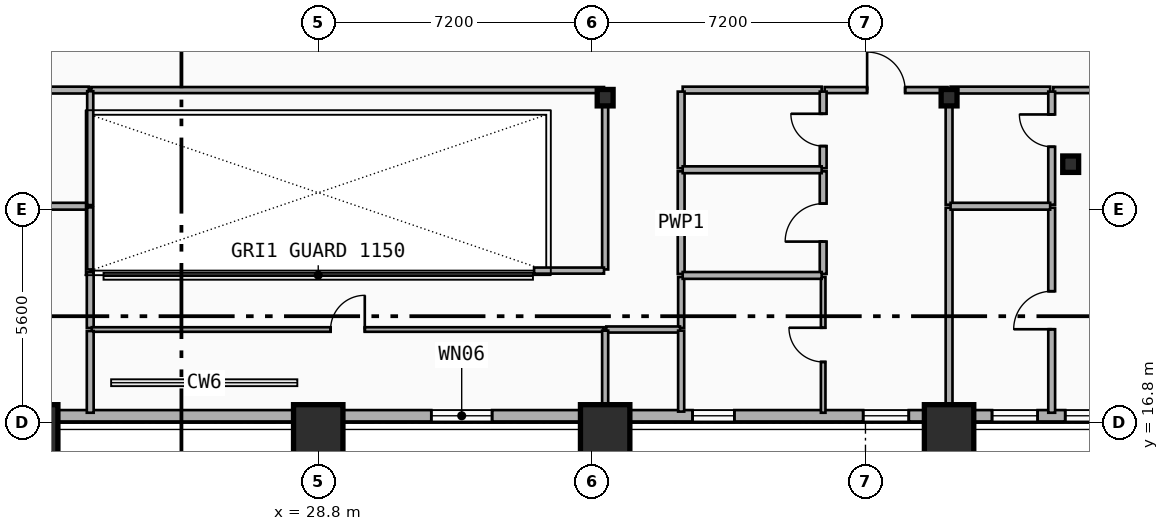
"""IFC4 building model, lengths in metres.
Left out: names, types, materials, properties, quantities, classifications, styles, units other than length and angle.
Written with IfcOpenShell. Run it as: python <this file> out.ifc"""

import sys

from ifc_helpers import new_model, si_unit, direction, frame, frame_2d, origin, origin_2d, place, context, subcontext, project, spatial, rectangle, i_section, extrude, element, fill, save


model = new_model("IFC4")
c1 = context("Model", 3, precision=1e-05, world=origin(), true_north=direction((0.0, 1.0)))
c2 = subcontext(c1, "Body", "Model", "MODEL_VIEW")
j1 = project(units=[si_unit("LENGTHUNIT", "METRE"), si_unit("PLANEANGLEUNIT", "RADIAN")], contexts=[c1])
p1 = place(None, origin())
s1 = spatial("IfcSite", under=j1, at=p1, CompositionType="ELEMENT")
p2 = place(p1, origin())
s2 = spatial("IfcBuilding", under=s1, at=p2, CompositionType="ELEMENT")
p3 = place(p2, frame((0.0, 0.0, 104.8)))
s3 = spatial("IfcBuildingStorey", under=s2, at=p3, CompositionType="ELEMENT", Elevation=104.8)
for number, where, z_axis, x_axis in (
    (1, (36.35, 25.35, 0.0), (0.0, 0.0, 1.0), (1.0, 0.0, 0.0)),
    (2, (45.4, 25.35, 0.0), (0.0, 0.0, 1.0), (1.0, 0.0, 0.0)),
):
    element("IfcColumn", number, at=place(p3, frame(where, z_axis=z_axis, x_axis=x_axis)), inside=s3, PredefinedType="COLUMN", context=c2, shape_type="SweptSolid", body=[
        extrude(i_section(OverallWidth=0.418, OverallDepth=0.432, WebThickness=0.035, FlangeThickness=0.056, FilletRadius=0.015, at=origin_2d()), origin(), (0.0, 0.0, 1.0), 3.5),
    ])
for number, where, z_axis, x_axis in (
    (3, (21.3, 16.731, 0.0), (0.0, -0.09, 0.996), (1.0, 0.0, 0.0)),
    (4, (28.8, 16.731, 0.0), (0.0, -0.09, 0.996), (1.0, 0.0, 0.0)),
    (5, (36.35, 16.731, 0.0), (0.0, -0.09, 0.996), (1.0, 0.0, 0.0)),
    (6, (45.4, 16.731, 0.0), (0.0, -0.09, 0.996), (1.0, 0.0, 0.0)),
):
    element("IfcColumn", number, at=place(p3, frame(where, z_axis=z_axis, x_axis=x_axis)), inside=s3, PredefinedType="COLUMN", context=c2, shape_type="SweptSolid", body=[
        extrude(rectangle(XDim=1.3, YDim=1.3, at=origin_2d()), origin(), (0.0, 0.0, 1.0), 3.514),
    ])
p4 = place(p3, frame((48.6, 23.6, 0.0), z_axis=(0.0, 0.0, 1.0), x_axis=(1.0, 0.0, 0.0)))
e7 = element("IfcColumn", 7, at=p4, inside=s3, PredefinedType="COLUMN", context=c2, shape_type="SweptSolid", body=[
    extrude(i_section(OverallWidth=0.418, OverallDepth=0.432, WebThickness=0.035, FlangeThickness=0.056, FilletRadius=0.015, at=origin_2d()), origin(), (0.0, 0.0, 1.0), 3.5),
])
p5 = place(p3, frame((53.4, 16.98, 0.0), z_axis=(0.0, 0.0, 1.0), x_axis=(-1.0, 0.0, 0.0)))
e8 = element("IfcWall", 8, at=p5, inside=s3, PredefinedType="SOLIDWALL", context=c2, shape_type="SweptSolid", body=[
    extrude(rectangle(XDim=49.2, YDim=0.3, at=frame_2d((24.6, 0.0))), origin(), (0.0, 0.0, 1.0), 3.24),
])
p6 = place(p5, frame((44.256, 0.0, 0.75)))
e9 = element("IfcOpeningElement", 9, at=p6, cuts=e8, PredefinedType="OPENING", context=c2, shape_type="SweptSolid", body=[
    extrude(rectangle(XDim=1.4, YDim=1.8, at=frame_2d((0.7, 0.9))), frame((0.0, 0.16, 0.0), z_axis=(0.0, -1.0, 0.0), x_axis=(1.0, 0.0, 0.0)), (0.0, 0.0, 1.0), 0.32),
])
p7 = place(p5, frame((42.33, 0.0, 0.68)))
e10 = element("IfcOpeningElement", 10, at=p7, cuts=e8, PredefinedType="OPENING", context=c2, shape_type="SweptSolid", body=[
    extrude(rectangle(XDim=1.2, YDim=1.5, at=frame_2d((0.6, 0.75))), frame((0.0, 0.16, 0.0), z_axis=(0.0, -1.0, 0.0), x_axis=(1.0, 0.0, 0.0)), (0.0, 0.0, 1.0), 0.32),
])
p8 = place(p5, frame((33.338, 0.0, 0.34)))
e11 = element("IfcOpeningElement", 11, at=p8, cuts=e8, PredefinedType="OPENING", context=c2, shape_type="SweptSolid", body=[
    extrude(rectangle(XDim=1.2, YDim=1.5, at=frame_2d((0.6, 0.75))), frame((0.0, 0.16, 0.0), z_axis=(0.0, -1.0, 0.0), x_axis=(1.0, 0.0, 0.0)), (0.0, 0.0, 1.0), 0.32),
])
p9 = place(p5, frame((39.04, 0.0, 1.22)))
e12 = element("IfcOpeningElement", 12, at=p9, cuts=e8, PredefinedType="OPENING", context=c2, shape_type="SweptSolid", body=[
    extrude(rectangle(XDim=1.1, YDim=1.05, at=frame_2d((0.55, 0.525))), frame((0.0, 0.16, 0.0), z_axis=(0.0, -1.0, 0.0), x_axis=(1.0, 0.0, 0.0)), (0.0, 0.0, 1.0), 0.32),
])
p10 = place(p5, frame((20.025, 0.0, 0.65)))
e13 = element("IfcOpeningElement", 13, at=p10, cuts=e8, PredefinedType="OPENING", context=c2, shape_type="SweptSolid", body=[
    extrude(rectangle(XDim=1.6, YDim=1.95, at=frame_2d((0.8, 0.975))), frame((0.0, 0.16, 0.0), z_axis=(0.0, -1.0, 0.0), x_axis=(1.0, 0.0, 0.0)), (0.0, 0.0, 1.0), 0.32),
])
p11 = place(p5, frame((9.06, 0.0, 0.48)))
e14 = element("IfcOpeningElement", 14, at=p11, cuts=e8, PredefinedType="OPENING", context=c2, shape_type="SweptSolid", body=[
    extrude(rectangle(XDim=1.2, YDim=1.5, at=frame_2d((0.6, 0.75))), frame((0.0, 0.16, 0.0), z_axis=(0.0, -1.0, 0.0), x_axis=(1.0, 0.0, 0.0)), (0.0, 0.0, 1.0), 0.32),
])
p12 = place(p5, frame((13.65, 0.0, 1.68)))
e15 = element("IfcOpeningElement", 15, at=p12, cuts=e8, PredefinedType="OPENING", context=c2, shape_type="SweptSolid", body=[
    extrude(rectangle(XDim=1.1, YDim=1.05, at=frame_2d((0.55, 0.525))), frame((0.0, 0.16, 0.0), z_axis=(0.0, -1.0, 0.0), x_axis=(1.0, 0.0, 0.0)), (0.0, 0.0, 1.0), 0.32),
])
p13 = place(p5, frame((3.544, 0.0, 0.75)))
e16 = element("IfcOpeningElement", 16, at=p13, cuts=e8, PredefinedType="OPENING", context=c2, shape_type="SweptSolid", body=[
    extrude(rectangle(XDim=1.4, YDim=1.8, at=frame_2d((0.7, 0.9))), frame((0.0, 0.16, 0.0), z_axis=(0.0, -1.0, 0.0), x_axis=(1.0, 0.0, 0.0)), (0.0, 0.0, 1.0), 0.32),
])
p14 = place(p5, frame((5.67, 0.0, 0.68)))
e17 = element("IfcOpeningElement", 17, at=p14, cuts=e8, PredefinedType="OPENING", context=c2, shape_type="SweptSolid", body=[
    extrude(rectangle(XDim=1.2, YDim=1.5, at=frame_2d((0.6, 0.75))), frame((0.0, 0.16, 0.0), z_axis=(0.0, -1.0, 0.0), x_axis=(1.0, 0.0, 0.0)), (0.0, 0.0, 1.0), 0.32),
])
p15 = place(p3, frame((20.402, 25.55, 0.0), z_axis=(0.0, 0.0, 1.0), x_axis=(1.0, 0.0, 0.0)))
e18 = element("IfcWall", 18, at=p15, inside=s3, PredefinedType="PLUMBINGWALL", context=c2, shape_type="SweptSolid", body=[
    extrude(rectangle(XDim=2.358, YDim=0.18, at=frame_2d((1.179, 0.0))), origin(), (0.0, 0.0, 1.0), 2.31),
])
p16 = place(p3, frame((42.127, 25.55, 0.0), z_axis=(0.0, 0.0, 1.0), x_axis=(1.0, 0.0, 0.0)))
e19 = element("IfcWall", 19, at=p16, inside=s3, PredefinedType="PARTITIONING", context=c2, shape_type="SweptSolid", body=[
    extrude(rectangle(XDim=3.233, YDim=0.16, at=frame_2d((1.617, 0.0))), origin(), (0.0, 0.0, 1.0), 2.31),
])
p17 = place(p16, frame((1.116, 0.0, 0.0)))
e20 = element("IfcOpeningElement", 20, at=p17, cuts=e19, PredefinedType="OPENING", context=c2, shape_type="SweptSolid", body=[
    extrude(rectangle(XDim=1.0, YDim=2.15, at=frame_2d((0.5, 1.075))), frame((0.0, 0.09, 0.0), z_axis=(0.0, -1.0, 0.0), x_axis=(1.0, 0.0, 0.0)), (0.0, 0.0, 1.0), 0.18),
])
p18 = place(p3, frame((38.39, 25.55, 0.0), z_axis=(0.0, 0.0, 1.0), x_axis=(1.0, 0.0, 0.0)))
e21 = element("IfcWall", 21, at=p18, inside=s3, PredefinedType="PLUMBINGWALL", context=c2, shape_type="SweptSolid", body=[
    extrude(rectangle(XDim=3.657, YDim=0.18, at=frame_2d((1.829, 0.0))), origin(), (0.0, 0.0, 1.0), 3.24),
])
p19 = place(p3, frame((48.14, 25.55, 0.0), z_axis=(0.0, 0.0, 1.0), x_axis=(1.0, 0.0, 0.0)))
e22 = element("IfcWall", 22, at=p19, inside=s3, PredefinedType="PARTITIONING", context=c2, shape_type="SweptSolid", body=[
    extrude(rectangle(XDim=4.338, YDim=0.16, at=frame_2d((2.169, 0.0))), origin(), (0.0, 0.0, 1.0), 2.57),
])
p20 = place(p19, frame((1.669, 0.0, 0.0)))
e23 = element("IfcOpeningElement", 23, at=p20, cuts=e22, PredefinedType="OPENING", context=c2, shape_type="SweptSolid", body=[
    extrude(rectangle(XDim=1.0, YDim=2.15, at=frame_2d((0.5, 1.075))), frame((0.0, 0.09, 0.0), z_axis=(0.0, -1.0, 0.0), x_axis=(1.0, 0.0, 0.0)), (0.0, 0.0, 1.0), 0.18),
])
p21 = place(p3, frame((45.44, 25.55, 0.0), z_axis=(0.0, 0.0, 1.0), x_axis=(1.0, 0.0, 0.0)))
e24 = element("IfcWall", 24, at=p21, inside=s3, PredefinedType="PLUMBINGWALL", context=c2, shape_type="SweptSolid", body=[
    extrude(rectangle(XDim=2.62, YDim=0.18, at=frame_2d((1.31, 0.0))), origin(), (0.0, 0.0, 1.0), 2.31),
])
p22 = place(p3, frame((38.35, 19.29, 0.0), z_axis=(0.0, 0.0, 1.0), x_axis=(0.0, 1.0, 0.0)))
e25 = element("IfcWall", 25, at=p22, inside=s3, PredefinedType="PARTITIONING", context=c2, shape_type="SweptSolid", body=[
    extrude(rectangle(XDim=1.343, YDim=0.16, at=frame_2d((0.671, 0.0))), origin(), (0.0, 0.0, 1.0), 2.78),
])
p23 = place(p3, frame((38.35, 20.713, 0.0), z_axis=(0.0, 0.0, 1.0), x_axis=(0.0, 1.0, 0.0)))
e26 = element("IfcWall", 26, at=p23, inside=s3, PredefinedType="PLUMBINGWALL", context=c2, shape_type="SweptSolid", body=[
    extrude(rectangle(XDim=2.7, YDim=0.18, at=frame_2d((1.35, 0.0))), origin(), (0.0, 0.0, 1.0), 2.91),
])
p24 = place(p3, frame((38.35, 23.493, 0.0), z_axis=(0.0, 0.0, 1.0), x_axis=(0.0, 1.0, 0.0)))
e27 = element("IfcWall", 27, at=p24, inside=s3, PredefinedType="PLUMBINGWALL", context=c2, shape_type="SweptSolid", body=[
    extrude(rectangle(XDim=2.017, YDim=0.18, at=frame_2d((1.009, 0.0))), origin(), (0.0, 0.0, 1.0), 3.24),
])
p25 = place(p3, frame((22.8, 19.29, 0.0), z_axis=(0.0, 0.0, 1.0), x_axis=(0.0, 1.0, 0.0)))
e28 = element("IfcWall", 28, at=p25, inside=s3, PredefinedType="PLUMBINGWALL", context=c2, shape_type="SweptSolid", body=[
    extrude(rectangle(XDim=1.47, YDim=0.18, at=frame_2d((0.735, 0.0))), origin(), (0.0, 0.0, 1.0), 2.68),
])
p26 = place(p3, frame((22.84, 19.25, 0.0), z_axis=(0.0, 0.0, 1.0), x_axis=(1.0, 0.0, 0.0)))
e29 = element("IfcWall", 29, at=p26, inside=s3, PredefinedType="PARTITIONING", context=c2, shape_type="SweptSolid", body=[
    extrude(rectangle(XDim=13.47, YDim=0.12, at=frame_2d((6.735, 0.0))), origin(), (0.0, 0.0, 1.0), 2.31),
])
p27 = place(p26, frame((6.285, 0.0, 0.0)))
e30 = element("IfcOpeningElement", 30, at=p27, cuts=e29, PredefinedType="OPENING", context=c2, shape_type="SweptSolid", body=[
    extrude(rectangle(XDim=0.9, YDim=2.1, at=frame_2d((0.45, 1.05))), frame((0.0, 0.07, 0.0), z_axis=(0.0, -1.0, 0.0), x_axis=(1.0, 0.0, 0.0)), (0.0, 0.0, 1.0), 0.14),
])
p28 = place(p3, frame((20.402, 22.494, 0.0), z_axis=(0.0, 0.0, 1.0), x_axis=(1.0, 0.0, 0.0)))
e31 = element("IfcWall", 31, at=p28, inside=s3, PredefinedType="PLUMBINGWALL", context=c2, shape_type="SweptSolid", body=[
    extrude(rectangle(XDim=2.358, YDim=0.18, at=frame_2d((1.179, 0.0))), origin(), (0.0, 0.0, 1.0), 2.31),
])
p29 = place(p3, frame((22.8, 17.06, 0.0), z_axis=(0.0, 0.0, 1.0), x_axis=(0.0, 1.0, 0.0)))
e32 = element("IfcWall", 32, at=p29, inside=s3, PredefinedType="PLUMBINGWALL", context=c2, shape_type="SweptSolid", body=[
    extrude(rectangle(XDim=2.15, YDim=0.18, at=frame_2d((1.075, 0.0))), origin(), (0.0, 0.0, 1.0), 3.24),
])
p30 = place(p3, frame((42.087, 17.06, 0.0), z_axis=(0.0, 0.0, 1.0), x_axis=(0.0, 1.0, 0.0)))
e33 = element("IfcWall", 33, at=p30, inside=s3, PredefinedType="PARTITIONING", context=c2, shape_type="SweptSolid", body=[
    extrude(rectangle(XDim=3.573, YDim=0.12, at=frame_2d((1.787, 0.0))), origin(), (0.0, 0.0, 1.0), 2.78),
])
p31 = place(p30, frame((1.336, 0.0, 0.0)))
e34 = element("IfcOpeningElement", 34, at=p31, cuts=e33, PredefinedType="OPENING", context=c2, shape_type="SweptSolid", body=[
    extrude(rectangle(XDim=0.9, YDim=2.1, at=frame_2d((0.45, 1.05))), frame((0.0, 0.07, 0.0), z_axis=(0.0, -1.0, 0.0), x_axis=(1.0, 0.0, 0.0)), (0.0, 0.0, 1.0), 0.14),
])
p32 = place(p3, frame((42.087, 20.713, 0.0), z_axis=(0.0, 0.0, 1.0), x_axis=(0.0, 1.0, 0.0)))
e35 = element("IfcWall", 35, at=p32, inside=s3, PredefinedType="PLUMBINGWALL", context=c2, shape_type="SweptSolid", body=[
    extrude(rectangle(XDim=2.7, YDim=0.18, at=frame_2d((1.35, 0.0))), origin(), (0.0, 0.0, 1.0), 2.91),
])
p33 = place(p32, frame((0.85, 0.0, 0.0)))
e36 = element("IfcOpeningElement", 36, at=p33, cuts=e35, PredefinedType="OPENING", context=c2, shape_type="SweptSolid", body=[
    extrude(rectangle(XDim=1.0, YDim=2.15, at=frame_2d((0.5, 1.075))), frame((0.0, 0.1, 0.0), z_axis=(0.0, -1.0, 0.0), x_axis=(1.0, 0.0, 0.0)), (0.0, 0.0, 1.0), 0.2),
])
p34 = place(p3, frame((42.087, 23.493, 0.0), z_axis=(0.0, 0.0, 1.0), x_axis=(0.0, 1.0, 0.0)))
e37 = element("IfcWall", 37, at=p34, inside=s3, PredefinedType="PLUMBINGWALL", context=c2, shape_type="SweptSolid", body=[
    extrude(rectangle(XDim=2.017, YDim=0.18, at=frame_2d((1.009, 0.0))), origin(), (0.0, 0.0, 1.0), 3.24),
])
p35 = place(p34, frame((0.583, 0.0, 0.0)))
e38 = element("IfcOpeningElement", 38, at=p35, cuts=e37, PredefinedType="OPENING", context=c2, shape_type="SweptSolid", body=[
    extrude(rectangle(XDim=0.85, YDim=2.1, at=frame_2d((0.425, 1.05))), frame((0.0, 0.1, 0.0), z_axis=(0.0, -1.0, 0.0), x_axis=(1.0, 0.0, 0.0)), (0.0, 0.0, 1.0), 0.2),
])
p36 = place(p3, frame((45.4, 17.06, 0.0), z_axis=(0.0, 0.0, 1.0), x_axis=(0.0, 1.0, 0.0)))
e39 = element("IfcWall", 39, at=p36, inside=s3, PredefinedType="PLUMBINGWALL", context=c2, shape_type="SweptSolid", body=[
    extrude(rectangle(XDim=5.394, YDim=0.18, at=frame_2d((2.697, 0.0))), origin(), (0.0, 0.0, 1.0), 2.31),
])
p37 = place(p3, frame((45.4, 22.534, 0.0), z_axis=(0.0, 0.0, 1.0), x_axis=(0.0, 1.0, 0.0)))
e40 = element("IfcWall", 40, at=p37, inside=s3, PredefinedType="PLUMBINGWALL", context=c2, shape_type="SweptSolid", body=[
    extrude(rectangle(XDim=2.976, YDim=0.18, at=frame_2d((1.488, 0.0))), origin(), (0.0, 0.0, 1.0), 2.31),
])
for number, where, z_axis, x_axis in (
    (41, (38.39, 20.673, 0.0), (0.0, 0.0, 1.0), (1.0, 0.0, 0.0)),
    (42, (38.39, 23.453, 0.0), (0.0, 0.0, 1.0), (1.0, 0.0, 0.0)),
):
    element("IfcWall", number, at=place(p3, frame(where, z_axis=z_axis, x_axis=x_axis)), inside=s3, PredefinedType="PLUMBINGWALL", context=c2, shape_type="SweptSolid", body=[
        extrude(rectangle(XDim=3.657, YDim=0.18, at=frame_2d((1.829, 0.0))), origin(), (0.0, 0.0, 1.0), 3.24),
    ])
p38 = place(p3, frame((48.1, 17.06, 0.0), z_axis=(0.0, 0.0, 1.0), x_axis=(0.0, 1.0, 0.0)))
e43 = element("IfcWall", 43, at=p38, inside=s3, PredefinedType="PLUMBINGWALL", context=c2, shape_type="SweptSolid", body=[
    extrude(rectangle(XDim=5.394, YDim=0.18, at=frame_2d((2.697, 0.0))), origin(), (0.0, 0.0, 1.0), 2.72),
])
p39 = place(p38, frame((2.197, 0.0, 0.0)))
e44 = element("IfcOpeningElement", 44, at=p39, cuts=e43, PredefinedType="OPENING", context=c2, shape_type="SweptSolid", body=[
    extrude(rectangle(XDim=1.0, YDim=2.15, at=frame_2d((0.5, 1.075))), frame((0.0, 0.1, 0.0), z_axis=(0.0, -1.0, 0.0), x_axis=(1.0, 0.0, 0.0)), (0.0, 0.0, 1.0), 0.2),
])
p40 = place(p3, frame((48.1, 22.534, 0.0), z_axis=(0.0, 0.0, 1.0), x_axis=(0.0, 1.0, 0.0)))
e45 = element("IfcWall", 45, at=p40, inside=s3, PredefinedType="PLUMBINGWALL", context=c2, shape_type="SweptSolid", body=[
    extrude(rectangle(XDim=2.976, YDim=0.18, at=frame_2d((1.488, 0.0))), origin(), (0.0, 0.0, 1.0), 2.72),
])
p41 = place(p40, frame((1.524, 0.0, 0.0)))
e46 = element("IfcOpeningElement", 46, at=p41, cuts=e45, PredefinedType="OPENING", context=c2, shape_type="SweptSolid", body=[
    extrude(rectangle(XDim=0.85, YDim=2.1, at=frame_2d((0.425, 1.05))), frame((0.0, 0.1, 0.0), z_axis=(0.0, -1.0, 0.0), x_axis=(1.0, 0.0, 0.0)), (0.0, 0.0, 1.0), 0.2),
])
p42 = place(p3, frame((45.44, 22.494, 0.0), z_axis=(0.0, 0.0, 1.0), x_axis=(1.0, 0.0, 0.0)))
e47 = element("IfcWall", 47, at=p42, inside=s3, PredefinedType="PLUMBINGWALL", context=c2, shape_type="SweptSolid", body=[
    extrude(rectangle(XDim=2.62, YDim=0.18, at=frame_2d((1.31, 0.0))), origin(), (0.0, 0.0, 1.0), 2.31),
])
p43 = place(p3, frame((22.83, 25.55, 0.0), z_axis=(0.0, 0.0, 1.0), x_axis=(1.0, 0.0, 0.0)))
e48 = element("IfcWall", 48, at=p43, inside=s3, PredefinedType="PARTITIONING", context=c2, shape_type="SweptSolid", body=[
    extrude(rectangle(XDim=13.49, YDim=0.16, at=frame_2d((6.745, 0.0))), origin(), (0.0, 0.0, 1.0), 2.31),
])
p44 = place(p3, frame((36.38, 19.25, 0.0), z_axis=(0.0, 0.0, 1.0), x_axis=(1.0, 0.0, 0.0)))
e49 = element("IfcWall", 49, at=p44, inside=s3, PredefinedType="PARTITIONING", context=c2, shape_type="SweptSolid", body=[
    extrude(rectangle(XDim=1.94, YDim=0.16, at=frame_2d((0.97, 0.0))), origin(), (0.0, 0.0, 1.0), 2.31),
])
p45 = place(p3, frame((36.35, 20.83, 0.0), z_axis=(0.0, 0.0, 1.0), x_axis=(0.0, 1.0, 0.0)))
e50 = element("IfcWall", 50, at=p45, inside=s3, PredefinedType="PARTITIONING", context=c2, shape_type="SweptSolid", body=[
    extrude(rectangle(XDim=4.69, YDim=0.16, at=frame_2d((2.345, 0.0))), origin(), (0.0, 0.0, 1.0), 2.31),
])
p46 = place(p3, frame((34.48, 20.8, 0.0), z_axis=(0.0, 0.0, 1.0), x_axis=(1.0, 0.0, 0.0)))
e51 = element("IfcWall", 51, at=p46, inside=s3, PredefinedType="PARTITIONING", context=c2, shape_type="SweptSolid", body=[
    extrude(rectangle(XDim=1.84, YDim=0.16, at=frame_2d((0.92, 0.0))), origin(), (0.0, 0.0, 1.0), 2.31),
])
p47 = place(p3, frame((22.8, 20.83, 0.0), z_axis=(0.0, 0.0, 1.0), x_axis=(0.0, 1.0, 0.0)))
e52 = element("IfcWall", 52, at=p47, inside=s3, PredefinedType="PARTITIONING", context=c2, shape_type="SweptSolid", body=[
    extrude(rectangle(XDim=1.634, YDim=0.16, at=frame_2d((0.817, 0.0))), origin(), (0.0, 0.0, 1.0), 2.68),
])
p48 = place(p3, frame((22.8, 22.524, 0.0), z_axis=(0.0, 0.0, 1.0), x_axis=(0.0, 1.0, 0.0)))
e53 = element("IfcWall", 53, at=p48, inside=s3, PredefinedType="PARTITIONING", context=c2, shape_type="SweptSolid", body=[
    extrude(rectangle(XDim=2.996, YDim=0.16, at=frame_2d((1.498, 0.0))), origin(), (0.0, 0.0, 1.0), 3.24),
])
p49 = place(p3, frame((36.35, 17.09, 0.0), z_axis=(0.0, 0.0, 1.0), x_axis=(0.0, 1.0, 0.0)))
e54 = element("IfcWall", 54, at=p49, inside=s3, PredefinedType="PARTITIONING", context=c2, shape_type="SweptSolid", body=[
    extrude(rectangle(XDim=2.13, YDim=0.16, at=frame_2d((1.065, 0.0))), origin(), (0.0, 0.0, 1.0), 2.31),
])
p50 = place(p3, frame((38.35, 17.09, 0.0), z_axis=(0.0, 0.0, 1.0), x_axis=(0.0, 1.0, 0.0)))
e55 = element("IfcWall", 55, at=p50, inside=s3, PredefinedType="PARTITIONING", context=c2, shape_type="SweptSolid", body=[
    extrude(rectangle(XDim=2.13, YDim=0.16, at=frame_2d((1.065, 0.0))), origin(), (0.0, 0.0, 1.0), 3.24),
])
p51 = place(p10, origin())
e56 = element("IfcWindow", 56, at=p51, inside=s3, PartitioningType="SINGLE_PANEL", PredefinedType="WINDOW", context=c2, shape_type="SweptSolid", body=[
    extrude(rectangle(XDim=1.6, YDim=1.95, at=frame_2d((0.8, 0.975))), frame((0.0, 0.03, 0.0), z_axis=(0.0, -1.0, 0.0), x_axis=(1.0, 0.0, 0.0)), (0.0, 0.0, 1.0), 0.06),
])
fill(e13, e56)
p52 = place(p11, origin())
e57 = element("IfcWindow", 57, at=p52, inside=s3, PartitioningType="SINGLE_PANEL", PredefinedType="WINDOW", context=c2, shape_type="SweptSolid", body=[
    extrude(rectangle(XDim=1.2, YDim=1.5, at=frame_2d((0.6, 0.75))), frame((0.0, 0.03, 0.0), z_axis=(0.0, -1.0, 0.0), x_axis=(1.0, 0.0, 0.0)), (0.0, 0.0, 1.0), 0.06),
])
fill(e14, e57)
p53 = place(p12, origin())
e58 = element("IfcWindow", 58, at=p53, inside=s3, PartitioningType="SINGLE_PANEL", PredefinedType="WINDOW", context=c2, shape_type="SweptSolid", body=[
    extrude(rectangle(XDim=1.1, YDim=1.05, at=frame_2d((0.55, 0.525))), frame((0.0, 0.03, 0.0), z_axis=(0.0, -1.0, 0.0), x_axis=(1.0, 0.0, 0.0)), (0.0, 0.0, 1.0), 0.06),
])
fill(e15, e58)
p54 = place(p13, origin())
e59 = element("IfcWindow", 59, at=p54, inside=s3, PartitioningType="SINGLE_PANEL", PredefinedType="WINDOW", context=c2, shape_type="SweptSolid", body=[
    extrude(rectangle(XDim=1.4, YDim=1.8, at=frame_2d((0.7, 0.9))), frame((0.0, 0.03, 0.0), z_axis=(0.0, -1.0, 0.0), x_axis=(1.0, 0.0, 0.0)), (0.0, 0.0, 1.0), 0.06),
])
fill(e16, e59)
p55 = place(p14, origin())
e60 = element("IfcWindow", 60, at=p55, inside=s3, PartitioningType="SINGLE_PANEL", PredefinedType="WINDOW", context=c2, shape_type="SweptSolid", body=[
    extrude(rectangle(XDim=1.2, YDim=1.5, at=frame_2d((0.6, 0.75))), frame((0.0, 0.03, 0.0), z_axis=(0.0, -1.0, 0.0), x_axis=(1.0, 0.0, 0.0)), (0.0, 0.0, 1.0), 0.06),
])
fill(e17, e60)
p56 = place(p17, origin())
e61 = element("IfcDoor", 61, at=p56, inside=s3, OperationType="SINGLE_SWING_LEFT", PredefinedType="DOOR", context=c2, shape_type="SweptSolid", body=[
    extrude(rectangle(XDim=1.0, YDim=2.15, at=frame_2d((0.5, 1.075))), frame((0.0, 0.025, 0.0), z_axis=(0.0, -1.0, 0.0), x_axis=(1.0, 0.0, 0.0)), (0.0, 0.0, 1.0), 0.05),
])
fill(e20, e61)
p57 = place(p27, origin())
e62 = element("IfcDoor", 62, at=p57, inside=s3, OperationType="SINGLE_SWING_RIGHT", PredefinedType="DOOR", context=c2, shape_type="SweptSolid", body=[
    extrude(rectangle(XDim=0.9, YDim=2.1, at=frame_2d((0.45, 1.05))), frame((0.0, 0.025, 0.0), z_axis=(0.0, -1.0, 0.0), x_axis=(1.0, 0.0, 0.0)), (0.0, 0.0, 1.0), 0.05),
])
fill(e30, e62)
p58 = place(p31, origin())
e63 = element("IfcDoor", 63, at=p58, inside=s3, OperationType="SINGLE_SWING_RIGHT", PredefinedType="DOOR", context=c2, shape_type="SweptSolid", body=[
    extrude(rectangle(XDim=0.9, YDim=2.1, at=frame_2d((0.45, 1.05))), frame((0.0, 0.025, 0.0), z_axis=(0.0, -1.0, 0.0), x_axis=(1.0, 0.0, 0.0)), (0.0, 0.0, 1.0), 0.05),
])
fill(e34, e63)
p59 = place(p33, origin())
e64 = element("IfcDoor", 64, at=p59, inside=s3, OperationType="SINGLE_SWING_LEFT", PredefinedType="DOOR", context=c2, shape_type="SweptSolid", body=[
    extrude(rectangle(XDim=1.0, YDim=2.15, at=frame_2d((0.5, 1.075))), frame((0.0, 0.025, 0.0), z_axis=(0.0, -1.0, 0.0), x_axis=(1.0, 0.0, 0.0)), (0.0, 0.0, 1.0), 0.05),
])
fill(e36, e64)
p60 = place(p35, origin())
e65 = element("IfcDoor", 65, at=p60, inside=s3, OperationType="SINGLE_SWING_RIGHT", PredefinedType="DOOR", context=c2, shape_type="SweptSolid", body=[
    extrude(rectangle(XDim=0.85, YDim=2.1, at=frame_2d((0.425, 1.05))), frame((0.0, 0.025, 0.0), z_axis=(0.0, -1.0, 0.0), x_axis=(1.0, 0.0, 0.0)), (0.0, 0.0, 1.0), 0.05),
])
fill(e38, e65)
p61 = place(p39, origin())
e66 = element("IfcDoor", 66, at=p61, inside=s3, OperationType="SINGLE_SWING_LEFT", PredefinedType="DOOR", context=c2, shape_type="SweptSolid", body=[
    extrude(rectangle(XDim=1.0, YDim=2.15, at=frame_2d((0.5, 1.075))), frame((0.0, 0.025, 0.0), z_axis=(0.0, -1.0, 0.0), x_axis=(1.0, 0.0, 0.0)), (0.0, 0.0, 1.0), 0.05),
])
fill(e44, e66)
p62 = place(p41, origin())
e67 = element("IfcDoor", 67, at=p62, inside=s3, OperationType="SINGLE_SWING_RIGHT", PredefinedType="DOOR", context=c2, shape_type="SweptSolid", body=[
    extrude(rectangle(XDim=0.85, YDim=2.1, at=frame_2d((0.425, 1.05))), frame((0.0, 0.025, 0.0), z_axis=(0.0, -1.0, 0.0), x_axis=(1.0, 0.0, 0.0)), (0.0, 0.0, 1.0), 0.05),
])
fill(e46, e67)
save(model, sys.argv[1])
